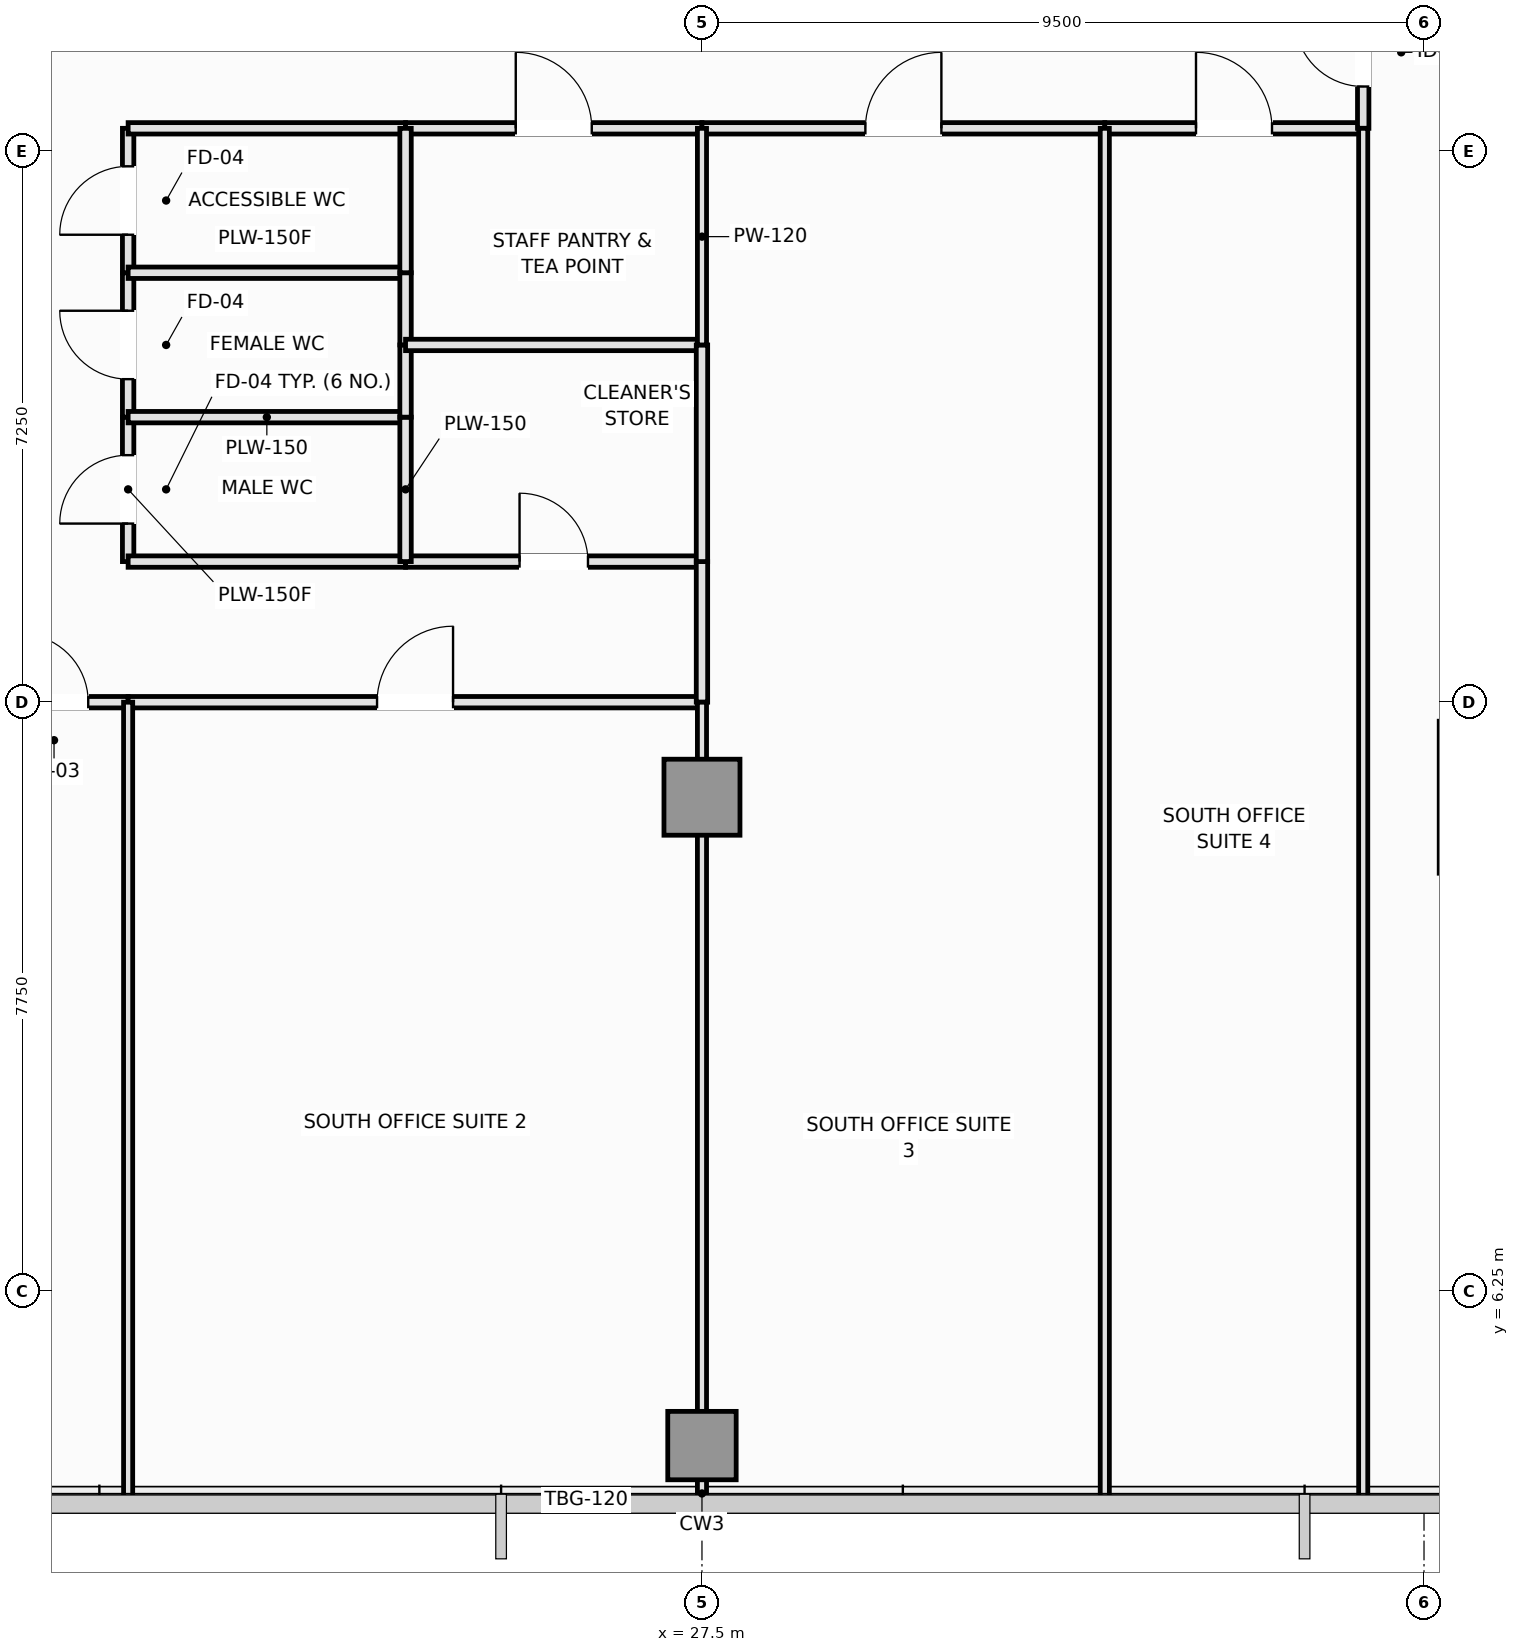
"""IFC4 building model, lengths in metres.
Left out: names, types, materials, properties, quantities, classifications, styles, units other than length and angle.
Written with IfcOpenShell. Run it as: python <this file> out.ifc"""

import sys

from ifc_helpers import new_model, si_unit, direction, frame, frame_2d, origin, origin_2d, place, context, subcontext, project, spatial, rectangle, extrude, element, fill, save


model = new_model("IFC4")
c1 = context("Model", 3, precision=1e-05, world=origin(), true_north=direction((0.0, 1.0)))
c2 = subcontext(c1, "Body", "Model", "MODEL_VIEW")
j1 = project(units=[si_unit("LENGTHUNIT", "METRE"), si_unit("PLANEANGLEUNIT", "RADIAN")], contexts=[c1])
p1 = place(None, origin())
s1 = spatial("IfcSite", under=j1, at=p1, CompositionType="ELEMENT")
p2 = place(p1, origin())
s2 = spatial("IfcBuilding", under=s1, at=p2, CompositionType="ELEMENT")
p3 = place(p2, frame((0.0, 0.0, 134.2)))
s3 = spatial("IfcBuildingStorey", under=s2, at=p3, CompositionType="ELEMENT", Elevation=134.2)
p4 = place(p3, frame((27.5, 12.75, 0.0), z_axis=(0.0, 0.0, 1.0), x_axis=(1.0, 0.0, 0.0)))
e1 = element("IfcColumn", 1, at=p4, inside=s3, PredefinedType="COLUMN", context=c2, shape_type="SweptSolid", body=[
    extrude(rectangle(XDim=1.0, YDim=1.0, at=origin_2d()), origin(), (0.0, 0.0, 1.0), 3.55),
])
p5 = place(p3, frame((27.5, 4.22, 0.0), z_axis=(0.0, 0.0, 1.0), x_axis=(1.0, 0.0, 0.0)))
e2 = element("IfcColumn", 2, at=p5, inside=s3, PredefinedType="COLUMN", context=c2, shape_type="SweptSolid", body=[
    extrude(rectangle(XDim=0.9, YDim=0.9, at=origin_2d()), origin(), (0.0, 0.0, 1.0), 3.55),
])
p6 = place(p3, frame((19.95, 15.85, 0.0), z_axis=(0.0, 0.0, 1.0), x_axis=(0.0, 1.0, 0.0)))
e3 = element("IfcWall", 3, at=p6, inside=s3, PredefinedType="PLUMBINGWALL", context=c2, shape_type="SweptSolid", body=[
    extrude(rectangle(XDim=1.9, YDim=0.15, at=frame_2d((0.95, 0.0))), origin(), (0.0, 0.0, 1.0), 3.37),
])
p7 = place(p6, frame((0.5, 0.0, 0.0)))
e4 = element("IfcOpeningElement", 4, at=p7, cuts=e3, PredefinedType="OPENING", context=c2, shape_type="SweptSolid", body=[
    extrude(rectangle(XDim=0.9, YDim=2.1, at=frame_2d((0.45, 1.05))), frame((0.0, 0.085, 0.0), z_axis=(0.0, -1.0, 0.0), x_axis=(1.0, 0.0, 0.0)), (0.0, 0.0, 1.0), 0.17),
])
p8 = place(p3, frame((19.95, 17.75, 0.0), z_axis=(0.0, 0.0, 1.0), x_axis=(0.0, 1.0, 0.0)))
e5 = element("IfcWall", 5, at=p8, inside=s3, PredefinedType="PLUMBINGWALL", context=c2, shape_type="SweptSolid", body=[
    extrude(rectangle(XDim=1.9, YDim=0.15, at=frame_2d((0.95, 0.0))), origin(), (0.0, 0.0, 1.0), 3.37),
])
p9 = place(p8, frame((0.5, 0.0, 0.0)))
e6 = element("IfcOpeningElement", 6, at=p9, cuts=e5, PredefinedType="OPENING", context=c2, shape_type="SweptSolid", body=[
    extrude(rectangle(XDim=0.9, YDim=2.1, at=frame_2d((0.45, 1.05))), frame((0.0, 0.085, 0.0), z_axis=(0.0, -1.0, 0.0), x_axis=(1.0, 0.0, 0.0)), (0.0, 0.0, 1.0), 0.17),
])
p10 = place(p3, frame((19.95, 19.65, 0.0), z_axis=(0.0, 0.0, 1.0), x_axis=(0.0, 1.0, 0.0)))
e7 = element("IfcWall", 7, at=p10, inside=s3, PredefinedType="PLUMBINGWALL", context=c2, shape_type="SweptSolid", body=[
    extrude(rectangle(XDim=1.9, YDim=0.15, at=frame_2d((0.95, 0.0))), origin(), (0.0, 0.0, 1.0), 3.37),
])
p11 = place(p10, frame((0.5, 0.0, 0.0)))
e8 = element("IfcOpeningElement", 8, at=p11, cuts=e7, PredefinedType="OPENING", context=c2, shape_type="SweptSolid", body=[
    extrude(rectangle(XDim=0.9, YDim=2.1, at=frame_2d((0.45, 1.05))), frame((0.0, 0.085, 0.0), z_axis=(0.0, -1.0, 0.0), x_axis=(1.0, 0.0, 0.0)), (0.0, 0.0, 1.0), 0.17),
])
p12 = place(p3, frame((18.0, 14.0, 0.0), z_axis=(0.0, 0.0, 1.0), x_axis=(1.0, 0.0, 0.0)))
e9 = element("IfcWall", 9, at=p12, inside=s3, PredefinedType="PARTITIONING", context=c2, shape_type="SweptSolid", body=[
    extrude(rectangle(XDim=1.95, YDim=0.15, at=frame_2d((0.975, 0.0))), origin(), (0.0, 0.0, 1.0), 3.37),
])
p13 = place(p12, frame((0.525, 0.0, 0.0)))
e10 = element("IfcOpeningElement", 10, at=p13, cuts=e9, PredefinedType="OPENING", context=c2, shape_type="SweptSolid", body=[
    extrude(rectangle(XDim=0.9, YDim=2.1, at=frame_2d((0.45, 1.05))), frame((0.0, 0.085, 0.0), z_axis=(0.0, -1.0, 0.0), x_axis=(1.0, 0.0, 0.0)), (0.0, 0.0, 1.0), 0.17),
])
p14 = place(p3, frame((19.95, 21.55, 0.0), z_axis=(0.0, 0.0, 1.0), x_axis=(1.0, 0.0, 0.0)))
e11 = element("IfcWall", 11, at=p14, inside=s3, PredefinedType="PLUMBINGWALL", context=c2, shape_type="SweptSolid", body=[
    extrude(rectangle(XDim=3.65, YDim=0.15, at=frame_2d((1.825, 0.0))), origin(), (0.0, 0.0, 1.0), 3.37),
])
p15 = place(p3, frame((23.6, 21.55, 0.0), z_axis=(0.0, 0.0, 1.0), x_axis=(1.0, 0.0, 0.0)))
e12 = element("IfcWall", 12, at=p15, inside=s3, PredefinedType="PARTITIONING", context=c2, shape_type="SweptSolid", body=[
    extrude(rectangle(XDim=3.9, YDim=0.15, at=frame_2d((1.95, 0.0))), origin(), (0.0, 0.0, 1.0), 3.37),
])
p16 = place(p15, frame((1.45, 0.0, 0.0)))
e13 = element("IfcOpeningElement", 13, at=p16, cuts=e12, PredefinedType="OPENING", context=c2, shape_type="SweptSolid", body=[
    extrude(rectangle(XDim=1.0, YDim=2.15, at=frame_2d((0.5, 1.075))), frame((0.0, 0.085, 0.0), z_axis=(0.0, -1.0, 0.0), x_axis=(1.0, 0.0, 0.0)), (0.0, 0.0, 1.0), 0.17),
])
p17 = place(p3, frame((27.5, 21.55, 0.0), z_axis=(0.0, 0.0, 1.0), x_axis=(1.0, 0.0, 0.0)))
e14 = element("IfcWall", 14, at=p17, inside=s3, PredefinedType="PARTITIONING", context=c2, shape_type="SweptSolid", body=[
    extrude(rectangle(XDim=5.3, YDim=0.15, at=frame_2d((2.65, 0.0))), origin(), (0.0, 0.0, 1.0), 3.37),
])
p18 = place(p17, frame((2.15, 0.0, 0.0)))
e15 = element("IfcOpeningElement", 15, at=p18, cuts=e14, PredefinedType="OPENING", context=c2, shape_type="SweptSolid", body=[
    extrude(rectangle(XDim=1.0, YDim=2.15, at=frame_2d((0.5, 1.075))), frame((0.0, 0.085, 0.0), z_axis=(0.0, -1.0, 0.0), x_axis=(1.0, 0.0, 0.0)), (0.0, 0.0, 1.0), 0.17),
])
p19 = place(p3, frame((32.8, 21.55, 0.0), z_axis=(0.0, 0.0, 1.0), x_axis=(1.0, 0.0, 0.0)))
e16 = element("IfcWall", 16, at=p19, inside=s3, PredefinedType="PARTITIONING", context=c2, shape_type="SweptSolid", body=[
    extrude(rectangle(XDim=3.4, YDim=0.15, at=frame_2d((1.7, 0.0))), origin(), (0.0, 0.0, 1.0), 3.37),
])
p20 = place(p19, frame((1.2, 0.0, 0.0)))
e17 = element("IfcOpeningElement", 17, at=p20, cuts=e16, PredefinedType="OPENING", context=c2, shape_type="SweptSolid", body=[
    extrude(rectangle(XDim=1.0, YDim=2.15, at=frame_2d((0.5, 1.075))), frame((0.0, 0.085, 0.0), z_axis=(0.0, -1.0, 0.0), x_axis=(1.0, 0.0, 0.0)), (0.0, 0.0, 1.0), 0.17),
])
p21 = place(p3, frame((36.2, 21.55, 0.0), z_axis=(0.0, 0.0, 1.0), x_axis=(0.0, 1.0, 0.0)))
e18 = element("IfcWall", 18, at=p21, inside=s3, PredefinedType="PARTITIONING", context=c2, shape_type="SweptSolid", body=[
    extrude(rectangle(XDim=2.0, YDim=0.15, at=frame_2d((1.0, 0.0))), origin(), (0.0, 0.0, 1.0), 3.37),
])
p22 = place(p21, frame((0.55, 0.0, 0.0)))
e19 = element("IfcOpeningElement", 19, at=p22, cuts=e18, PredefinedType="OPENING", context=c2, shape_type="SweptSolid", body=[
    extrude(rectangle(XDim=0.9, YDim=2.1, at=frame_2d((0.45, 1.05))), frame((0.0, 0.085, 0.0), z_axis=(0.0, -1.0, 0.0), x_axis=(1.0, 0.0, 0.0)), (0.0, 0.0, 1.0), 0.17),
])
p23 = place(p3, frame((19.95, 15.85, 0.0), z_axis=(0.0, 0.0, 1.0), x_axis=(1.0, 0.0, 0.0)))
e20 = element("IfcWall", 20, at=p23, inside=s3, PredefinedType="PLUMBINGWALL", context=c2, shape_type="SweptSolid", body=[
    extrude(rectangle(XDim=3.65, YDim=0.15, at=frame_2d((1.825, 0.0))), origin(), (0.0, 0.0, 1.0), 3.37),
])
p24 = place(p3, frame((23.6, 15.85, 0.0), z_axis=(0.0, 0.0, 1.0), x_axis=(1.0, 0.0, 0.0)))
e21 = element("IfcWall", 21, at=p24, inside=s3, PredefinedType="PLUMBINGWALL", context=c2, shape_type="SweptSolid", body=[
    extrude(rectangle(XDim=3.9, YDim=0.15, at=frame_2d((1.95, 0.0))), origin(), (0.0, 0.0, 1.0), 3.37),
])
p25 = place(p24, frame((1.5, 0.0, 0.0)))
e22 = element("IfcOpeningElement", 22, at=p25, cuts=e21, PredefinedType="OPENING", context=c2, shape_type="SweptSolid", body=[
    extrude(rectangle(XDim=0.9, YDim=2.1, at=frame_2d((0.45, 1.05))), frame((0.0, 0.085, 0.0), z_axis=(0.0, -1.0, 0.0), x_axis=(1.0, 0.0, 0.0)), (0.0, 0.0, 1.0), 0.17),
])
p26 = place(p3, frame((19.95, 14.0, 0.0), z_axis=(0.0, 0.0, 1.0), x_axis=(1.0, 0.0, 0.0)))
e23 = element("IfcWall", 23, at=p26, inside=s3, PredefinedType="PARTITIONING", context=c2, shape_type="SweptSolid", body=[
    extrude(rectangle(XDim=7.55, YDim=0.15, at=frame_2d((3.775, 0.0))), origin(), (0.0, 0.0, 1.0), 3.37),
])
p27 = place(p26, frame((3.275, 0.0, 0.0)))
e24 = element("IfcOpeningElement", 24, at=p27, cuts=e23, PredefinedType="OPENING", context=c2, shape_type="SweptSolid", body=[
    extrude(rectangle(XDim=1.0, YDim=2.15, at=frame_2d((0.5, 1.075))), frame((0.0, 0.085, 0.0), z_axis=(0.0, -1.0, 0.0), x_axis=(1.0, 0.0, 0.0)), (0.0, 0.0, 1.0), 0.17),
])
p28 = place(p3, frame((27.5, 14.0, 0.0), z_axis=(0.0, 0.0, 1.0), x_axis=(0.0, 1.0, 0.0)))
e25 = element("IfcWall", 25, at=p28, inside=s3, PredefinedType="PARTITIONING", context=c2, shape_type="SweptSolid", body=[
    extrude(rectangle(XDim=1.85, YDim=0.15, at=frame_2d((0.925, 0.0))), origin(), (0.0, 0.0, 1.0), 3.37),
])
p29 = place(p3, frame((19.95, 17.75, 0.0), z_axis=(0.0, 0.0, 1.0), x_axis=(1.0, 0.0, 0.0)))
e26 = element("IfcWall", 26, at=p29, inside=s3, PredefinedType="PLUMBINGWALL", context=c2, shape_type="SweptSolid", body=[
    extrude(rectangle(XDim=3.65, YDim=0.15, at=frame_2d((1.825, 0.0))), origin(), (0.0, 0.0, 1.0), 3.37),
])
p30 = place(p3, frame((23.6, 15.85, 0.0), z_axis=(0.0, 0.0, 1.0), x_axis=(0.0, 1.0, 0.0)))
e27 = element("IfcWall", 27, at=p30, inside=s3, PredefinedType="PLUMBINGWALL", context=c2, shape_type="SweptSolid", body=[
    extrude(rectangle(XDim=1.9, YDim=0.15, at=frame_2d((0.95, 0.0))), origin(), (0.0, 0.0, 1.0), 3.37),
])
p31 = place(p3, frame((19.95, 19.65, 0.0), z_axis=(0.0, 0.0, 1.0), x_axis=(1.0, 0.0, 0.0)))
e28 = element("IfcWall", 28, at=p31, inside=s3, PredefinedType="PLUMBINGWALL", context=c2, shape_type="SweptSolid", body=[
    extrude(rectangle(XDim=3.65, YDim=0.15, at=frame_2d((1.825, 0.0))), origin(), (0.0, 0.0, 1.0), 3.37),
])
for number, where, z_axis, x_axis in (
    (29, (23.6, 17.75, 0.0), (0.0, 0.0, 1.0), (0.0, 1.0, 0.0)),
    (30, (23.6, 18.7, 0.0), (0.0, 0.0, 1.0), (0.0, 1.0, 0.0)),
):
    element("IfcWall", number, at=place(p3, frame(where, z_axis=z_axis, x_axis=x_axis)), inside=s3, PredefinedType="PLUMBINGWALL", context=c2, shape_type="SweptSolid", body=[
        extrude(rectangle(XDim=0.95, YDim=0.15, at=frame_2d((0.475, 0.0))), origin(), (0.0, 0.0, 1.0), 3.37),
    ])
p32 = place(p3, frame((23.6, 19.65, 0.0), z_axis=(0.0, 0.0, 1.0), x_axis=(0.0, 1.0, 0.0)))
e31 = element("IfcWall", 31, at=p32, inside=s3, PredefinedType="PLUMBINGWALL", context=c2, shape_type="SweptSolid", body=[
    extrude(rectangle(XDim=1.9, YDim=0.15, at=frame_2d((0.95, 0.0))), origin(), (0.0, 0.0, 1.0), 3.37),
])
p33 = place(p3, frame((23.6, 18.7, 0.0), z_axis=(0.0, 0.0, 1.0), x_axis=(1.0, 0.0, 0.0)))
e32 = element("IfcWall", 32, at=p33, inside=s3, PredefinedType="PLUMBINGWALL", context=c2, shape_type="SweptSolid", body=[
    extrude(rectangle(XDim=3.9, YDim=0.15, at=frame_2d((1.95, 0.0))), origin(), (0.0, 0.0, 1.0), 3.37),
])
p34 = place(p3, frame((27.5, 15.85, 0.0), z_axis=(0.0, 0.0, 1.0), x_axis=(0.0, 1.0, 0.0)))
e33 = element("IfcWall", 33, at=p34, inside=s3, PredefinedType="PLUMBINGWALL", context=c2, shape_type="SweptSolid", body=[
    extrude(rectangle(XDim=2.85, YDim=0.15, at=frame_2d((1.425, 0.0))), origin(), (0.0, 0.0, 1.0), 3.37),
])
p35 = place(p3, frame((27.5, 18.7, 0.0), z_axis=(0.0, 0.0, 1.0), x_axis=(0.0, 1.0, 0.0)))
e34 = element("IfcWall", 34, at=p35, inside=s3, PredefinedType="PARTITIONING", context=c2, shape_type="SweptSolid", body=[
    extrude(rectangle(XDim=2.85, YDim=0.12, at=frame_2d((1.425, 0.0))), origin(), (0.0, 0.0, 1.0), 3.37),
])
p36 = place(p3, frame((19.95, 3.51, 0.0), z_axis=(0.0, 0.0, 1.0), x_axis=(0.0, 1.0, 0.0)))
e35 = element("IfcWall", 35, at=p36, inside=s3, PredefinedType="PARTITIONING", context=c2, shape_type="SweptSolid", body=[
    extrude(rectangle(XDim=10.49, YDim=0.12, at=frame_2d((5.245, 0.0))), origin(), (0.0, 0.0, 1.0), 3.37),
])
p37 = place(p3, frame((27.5, 3.51, 0.0), z_axis=(0.0, 0.0, 1.0), x_axis=(0.0, 1.0, 0.0)))
e36 = element("IfcWall", 36, at=p37, inside=s3, PredefinedType="PARTITIONING", context=c2, shape_type="SweptSolid", body=[
    extrude(rectangle(XDim=10.49, YDim=0.12, at=frame_2d((5.245, 0.0))), origin(), (0.0, 0.0, 1.0), 2.87),
])
for number, where, z_axis, x_axis in (
    (37, (32.8, 3.51, 0.0), (0.0, 0.0, 1.0), (0.0, 1.0, 0.0)),
    (38, (36.2, 3.51, 0.0), (0.0, 0.0, 1.0), (0.0, 1.0, 0.0)),
):
    element("IfcWall", number, at=place(p3, frame(where, z_axis=z_axis, x_axis=x_axis)), inside=s3, PredefinedType="PARTITIONING", context=c2, shape_type="SweptSolid", body=[
        extrude(rectangle(XDim=18.04, YDim=0.12, at=frame_2d((9.02, 0.0))), origin(), (0.0, 0.0, 1.0), 3.37),
    ])
p38 = place(p7, origin())
e39 = element("IfcDoor", 39, at=p38, inside=s3, OperationType="SINGLE_SWING_LEFT", PredefinedType="DOOR", context=c2, shape_type="SweptSolid", body=[
    extrude(rectangle(XDim=0.9, YDim=2.1, at=frame_2d((0.45, 1.05))), frame((0.0, 0.025, 0.0), z_axis=(0.0, -1.0, 0.0), x_axis=(1.0, 0.0, 0.0)), (0.0, 0.0, 1.0), 0.05),
])
fill(e4, e39)
p39 = place(p9, origin())
e40 = element("IfcDoor", 40, at=p39, inside=s3, OperationType="SINGLE_SWING_RIGHT", PredefinedType="DOOR", context=c2, shape_type="SweptSolid", body=[
    extrude(rectangle(XDim=0.9, YDim=2.1, at=frame_2d((0.45, 1.05))), frame((0.0, 0.025, 0.0), z_axis=(0.0, -1.0, 0.0), x_axis=(1.0, 0.0, 0.0)), (0.0, 0.0, 1.0), 0.05),
])
fill(e6, e40)
p40 = place(p11, origin())
e41 = element("IfcDoor", 41, at=p40, inside=s3, OperationType="SINGLE_SWING_LEFT", PredefinedType="DOOR", context=c2, shape_type="SweptSolid", body=[
    extrude(rectangle(XDim=0.9, YDim=2.1, at=frame_2d((0.45, 1.05))), frame((0.0, 0.025, 0.0), z_axis=(0.0, -1.0, 0.0), x_axis=(1.0, 0.0, 0.0)), (0.0, 0.0, 1.0), 0.05),
])
fill(e8, e41)
p41 = place(p13, origin())
e42 = element("IfcDoor", 42, at=p41, inside=s3, OperationType="SINGLE_SWING_LEFT", PredefinedType="DOOR", context=c2, shape_type="SweptSolid", body=[
    extrude(rectangle(XDim=0.9, YDim=2.1, at=frame_2d((0.45, 1.05))), frame((0.0, 0.025, 0.0), z_axis=(0.0, -1.0, 0.0), x_axis=(1.0, 0.0, 0.0)), (0.0, 0.0, 1.0), 0.05),
])
fill(e10, e42)
p42 = place(p16, origin())
e43 = element("IfcDoor", 43, at=p42, inside=s3, OperationType="SINGLE_SWING_LEFT", PredefinedType="DOOR", context=c2, shape_type="SweptSolid", body=[
    extrude(rectangle(XDim=1.0, YDim=2.15, at=frame_2d((0.5, 1.075))), frame((0.0, 0.025, 0.0), z_axis=(0.0, -1.0, 0.0), x_axis=(1.0, 0.0, 0.0)), (0.0, 0.0, 1.0), 0.05),
])
fill(e13, e43)
p43 = place(p18, origin())
e44 = element("IfcDoor", 44, at=p43, inside=s3, OperationType="SINGLE_SWING_RIGHT", PredefinedType="DOOR", context=c2, shape_type="SweptSolid", body=[
    extrude(rectangle(XDim=1.0, YDim=2.15, at=frame_2d((0.5, 1.075))), frame((0.0, 0.025, 0.0), z_axis=(0.0, -1.0, 0.0), x_axis=(1.0, 0.0, 0.0)), (0.0, 0.0, 1.0), 0.05),
])
fill(e15, e44)
p44 = place(p20, origin())
e45 = element("IfcDoor", 45, at=p44, inside=s3, OperationType="SINGLE_SWING_LEFT", PredefinedType="DOOR", context=c2, shape_type="SweptSolid", body=[
    extrude(rectangle(XDim=1.0, YDim=2.15, at=frame_2d((0.5, 1.075))), frame((0.0, 0.025, 0.0), z_axis=(0.0, -1.0, 0.0), x_axis=(1.0, 0.0, 0.0)), (0.0, 0.0, 1.0), 0.05),
])
fill(e17, e45)
p45 = place(p22, origin())
e46 = element("IfcDoor", 46, at=p45, inside=s3, OperationType="SINGLE_SWING_RIGHT", PredefinedType="DOOR", context=c2, shape_type="SweptSolid", body=[
    extrude(rectangle(XDim=0.9, YDim=2.1, at=frame_2d((0.45, 1.05))), frame((0.0, 0.025, 0.0), z_axis=(0.0, -1.0, 0.0), x_axis=(1.0, 0.0, 0.0)), (0.0, 0.0, 1.0), 0.05),
])
fill(e19, e46)
p46 = place(p25, origin())
e47 = element("IfcDoor", 47, at=p46, inside=s3, OperationType="SINGLE_SWING_LEFT", PredefinedType="DOOR", context=c2, shape_type="SweptSolid", body=[
    extrude(rectangle(XDim=0.9, YDim=2.1, at=frame_2d((0.45, 1.05))), frame((0.0, 0.025, 0.0), z_axis=(0.0, -1.0, 0.0), x_axis=(1.0, 0.0, 0.0)), (0.0, 0.0, 1.0), 0.05),
])
fill(e22, e47)
p47 = place(p27, origin())
e48 = element("IfcDoor", 48, at=p47, inside=s3, OperationType="SINGLE_SWING_RIGHT", PredefinedType="DOOR", context=c2, shape_type="SweptSolid", body=[
    extrude(rectangle(XDim=1.0, YDim=2.15, at=frame_2d((0.5, 1.075))), frame((0.0, 0.025, 0.0), z_axis=(0.0, -1.0, 0.0), x_axis=(1.0, 0.0, 0.0)), (0.0, 0.0, 1.0), 0.05),
])
fill(e24, e48)
save(model, sys.argv[1])
